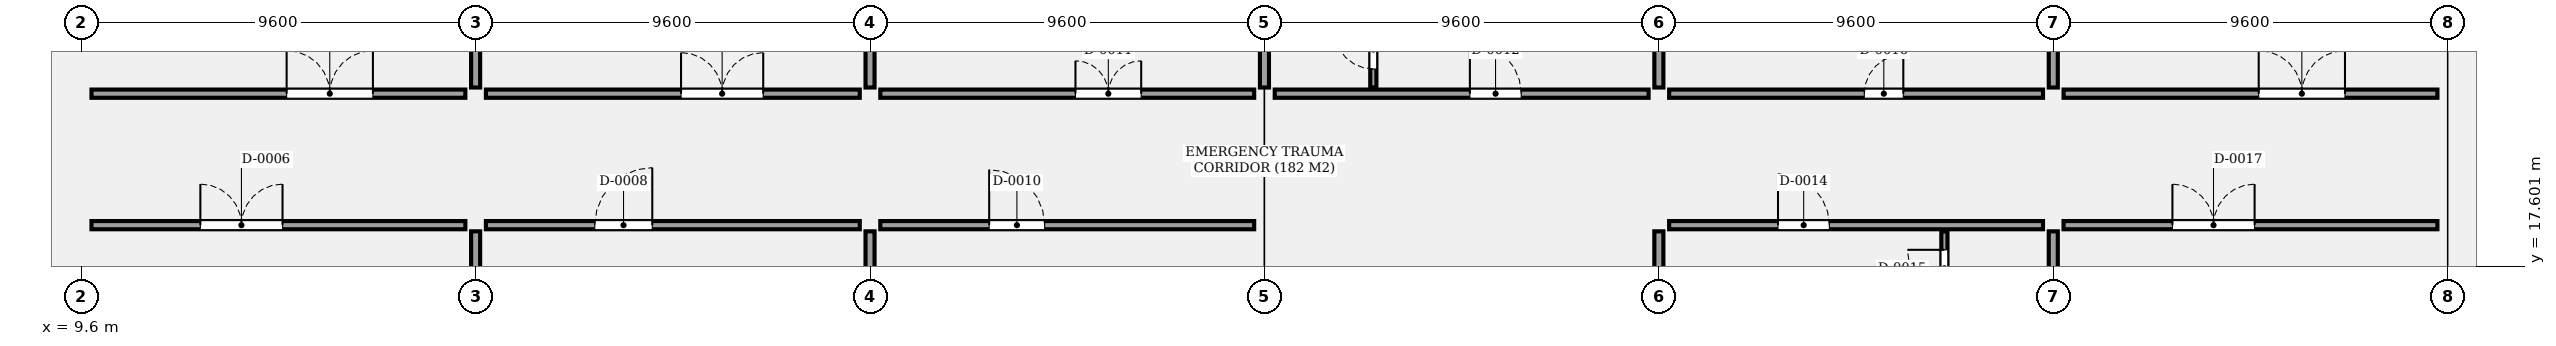
"""IFC4 building model, lengths in metres.
Left out: names, types, materials, properties, quantities, classifications, styles, units other than length and angle.
Written with IfcOpenShell. Run it as: python <this file> out.ifc"""

import sys

from ifc_helpers import new_model, si_unit, direction, frame, frame_2d, origin, place, context, subcontext, project, spatial, rectangle, extrude, element, fill, save


model = new_model("IFC4")
c1 = context("Model", 3, precision=1e-05, world=origin(), true_north=direction((0.0, 1.0)))
c2 = subcontext(c1, "Body", "Model", "MODEL_VIEW")
j1 = project(units=[si_unit("LENGTHUNIT", "METRE"), si_unit("PLANEANGLEUNIT", "RADIAN")], contexts=[c1])
p1 = place(None, origin())
s1 = spatial("IfcSite", under=j1, at=p1, CompositionType="ELEMENT")
p2 = place(p1, origin())
s2 = spatial("IfcBuilding", under=s1, at=p2, CompositionType="ELEMENT")
p3 = place(p2, origin())
s3 = spatial("IfcBuildingStorey", under=s2, at=p3, CompositionType="ELEMENT", Elevation=0.0)
p4 = place(p3, frame((9.85, 18.6, 0.0), z_axis=(0.0, 0.0, 1.0), x_axis=(1.0, 0.0, 0.0)))
e1 = element("IfcWall", 1, at=p4, inside=s3, PredefinedType="PARTITIONING", context=c2, shape_type="SweptSolid", body=[
    extrude(rectangle(XDim=9.1, YDim=0.2, at=frame_2d((4.55, 0.0))), origin(), (0.0, 0.0, 1.0), 3.98),
])
p5 = place(p4, frame((2.65, 0.0, 0.0)))
e2 = element("IfcOpeningElement", 2, at=p5, cuts=e1, PredefinedType="OPENING", context=c2, shape_type="SweptSolid", body=[
    extrude(rectangle(XDim=2.0, YDim=2.4, at=frame_2d((1.0, 1.2))), frame((0.0, 0.11, 0.0), z_axis=(0.0, -1.0, 0.0), x_axis=(1.0, 0.0, 0.0)), (0.0, 0.0, 1.0), 0.22),
])
p6 = place(p3, frame((9.85, 21.8, 0.0), z_axis=(0.0, 0.0, 1.0), x_axis=(1.0, 0.0, 0.0)))
e3 = element("IfcWall", 3, at=p6, inside=s3, PredefinedType="PARTITIONING", context=c2, shape_type="SweptSolid", body=[
    extrude(rectangle(XDim=9.1, YDim=0.2, at=frame_2d((4.55, 0.0))), origin(), (0.0, 0.0, 1.0), 3.98),
])
p7 = place(p6, frame((4.75, 0.0, 0.0)))
e4 = element("IfcOpeningElement", 4, at=p7, cuts=e3, PredefinedType="OPENING", context=c2, shape_type="SweptSolid", body=[
    extrude(rectangle(XDim=2.1, YDim=2.4, at=frame_2d((1.05, 1.2))), frame((0.0, 0.11, 0.0), z_axis=(0.0, -1.0, 0.0), x_axis=(1.0, 0.0, 0.0)), (0.0, 0.0, 1.0), 0.22),
])
p8 = place(p3, frame((19.45, 18.6, 0.0), z_axis=(0.0, 0.0, 1.0), x_axis=(1.0, 0.0, 0.0)))
e5 = element("IfcWall", 5, at=p8, inside=s3, PredefinedType="PARTITIONING", context=c2, shape_type="SweptSolid", body=[
    extrude(rectangle(XDim=9.1, YDim=0.2, at=frame_2d((4.55, 0.0))), origin(), (0.0, 0.0, 1.0), 3.98),
])
p9 = place(p8, frame((2.65, 0.0, 0.0)))
e6 = element("IfcOpeningElement", 6, at=p9, cuts=e5, PredefinedType="OPENING", context=c2, shape_type="SweptSolid", body=[
    extrude(rectangle(XDim=1.4, YDim=2.4, at=frame_2d((0.7, 1.2))), frame((0.0, 0.11, 0.0), z_axis=(0.0, -1.0, 0.0), x_axis=(1.0, 0.0, 0.0)), (0.0, 0.0, 1.0), 0.22),
])
p10 = place(p3, frame((19.2, 0.55, 0.0), z_axis=(0.0, 0.0, 1.0), x_axis=(0.0, 1.0, 0.0)))
e7 = element("IfcWall", 7, at=p10, inside=s3, PredefinedType="PARTITIONING", context=c2, shape_type="SweptSolid", body=[
    extrude(rectangle(XDim=17.9, YDim=0.22, at=frame_2d((8.95, 0.0))), origin(), (0.0, 0.0, 1.0), 3.98),
])
p11 = place(p3, frame((19.45, 21.8, 0.0), z_axis=(0.0, 0.0, 1.0), x_axis=(1.0, 0.0, 0.0)))
e8 = element("IfcWall", 8, at=p11, inside=s3, PredefinedType="PARTITIONING", context=c2, shape_type="SweptSolid", body=[
    extrude(rectangle(XDim=9.1, YDim=0.2, at=frame_2d((4.55, 0.0))), origin(), (0.0, 0.0, 1.0), 3.98),
])
p12 = place(p11, frame((4.75, 0.0, 0.0)))
e9 = element("IfcOpeningElement", 9, at=p12, cuts=e8, PredefinedType="OPENING", context=c2, shape_type="SweptSolid", body=[
    extrude(rectangle(XDim=2.0, YDim=2.4, at=frame_2d((1.0, 1.2))), frame((0.0, 0.11, 0.0), z_axis=(0.0, -1.0, 0.0), x_axis=(1.0, 0.0, 0.0)), (0.0, 0.0, 1.0), 0.22),
])
p13 = place(p3, frame((19.2, 21.95, 0.0), z_axis=(0.0, 0.0, 1.0), x_axis=(0.0, 1.0, 0.0)))
e10 = element("IfcWall", 10, at=p13, inside=s3, PredefinedType="PARTITIONING", context=c2, shape_type="SweptSolid", body=[
    extrude(rectangle(XDim=11.1, YDim=0.22, at=frame_2d((5.55, 0.0))), origin(), (0.0, 0.0, 1.0), 3.98),
])
p14 = place(p3, frame((29.05, 18.6, 0.0), z_axis=(0.0, 0.0, 1.0), x_axis=(1.0, 0.0, 0.0)))
e11 = element("IfcWall", 11, at=p14, inside=s3, PredefinedType="PARTITIONING", context=c2, shape_type="SweptSolid", body=[
    extrude(rectangle(XDim=9.1, YDim=0.2, at=frame_2d((4.55, 0.0))), origin(), (0.0, 0.0, 1.0), 3.98),
])
p15 = place(p14, frame((2.65, 0.0, 0.0)))
e12 = element("IfcOpeningElement", 12, at=p15, cuts=e11, PredefinedType="OPENING", context=c2, shape_type="SweptSolid", body=[
    extrude(rectangle(XDim=1.35, YDim=2.4, at=frame_2d((0.675, 1.2))), frame((0.0, 0.11, 0.0), z_axis=(0.0, -1.0, 0.0), x_axis=(1.0, 0.0, 0.0)), (0.0, 0.0, 1.0), 0.22),
])
p16 = place(p3, frame((28.8, 0.55, 0.0), z_axis=(0.0, 0.0, 1.0), x_axis=(0.0, 1.0, 0.0)))
e13 = element("IfcWall", 13, at=p16, inside=s3, PredefinedType="PARTITIONING", context=c2, shape_type="SweptSolid", body=[
    extrude(rectangle(XDim=17.9, YDim=0.22, at=frame_2d((8.95, 0.0))), origin(), (0.0, 0.0, 1.0), 3.98),
])
p17 = place(p3, frame((29.05, 21.8, 0.0), z_axis=(0.0, 0.0, 1.0), x_axis=(1.0, 0.0, 0.0)))
e14 = element("IfcWall", 14, at=p17, inside=s3, PredefinedType="PARTITIONING", context=c2, shape_type="SweptSolid", body=[
    extrude(rectangle(XDim=9.1, YDim=0.2, at=frame_2d((4.55, 0.0))), origin(), (0.0, 0.0, 1.0), 3.98),
])
p18 = place(p17, frame((4.75, 0.0, 0.0)))
e15 = element("IfcOpeningElement", 15, at=p18, cuts=e14, PredefinedType="OPENING", context=c2, shape_type="SweptSolid", body=[
    extrude(rectangle(XDim=1.6, YDim=2.2, at=frame_2d((0.8, 1.1))), frame((0.0, 0.11, 0.0), z_axis=(0.0, -1.0, 0.0), x_axis=(1.0, 0.0, 0.0)), (0.0, 0.0, 1.0), 0.22),
])
p19 = place(p3, frame((28.8, 21.95, 0.0), z_axis=(0.0, 0.0, 1.0), x_axis=(0.0, 1.0, 0.0)))
e16 = element("IfcWall", 16, at=p19, inside=s3, PredefinedType="PARTITIONING", context=c2, shape_type="SweptSolid", body=[
    extrude(rectangle(XDim=11.1, YDim=0.22, at=frame_2d((5.55, 0.0))), origin(), (0.0, 0.0, 1.0), 3.98),
])
p20 = place(p3, frame((38.65, 21.8, 0.0), z_axis=(0.0, 0.0, 1.0), x_axis=(1.0, 0.0, 0.0)))
e17 = element("IfcWall", 17, at=p20, inside=s3, PredefinedType="PARTITIONING", context=c2, shape_type="SweptSolid", body=[
    extrude(rectangle(XDim=9.1, YDim=0.2, at=frame_2d((4.55, 0.0))), origin(), (0.0, 0.0, 1.0), 3.98),
])
p21 = place(p20, frame((4.75, 0.0, 0.0)))
e18 = element("IfcOpeningElement", 18, at=p21, cuts=e17, PredefinedType="OPENING", context=c2, shape_type="SweptSolid", body=[
    extrude(rectangle(XDim=1.25, YDim=2.2, at=frame_2d((0.625, 1.1))), frame((0.0, 0.11, 0.0), z_axis=(0.0, -1.0, 0.0), x_axis=(1.0, 0.0, 0.0)), (0.0, 0.0, 1.0), 0.22),
])
p22 = place(p3, frame((41.05, 21.95, 0.0), z_axis=(0.0, 0.0, 1.0), x_axis=(0.0, 1.0, 0.0)))
e19 = element("IfcWall", 19, at=p22, inside=s3, PredefinedType="PARTITIONING", context=c2, shape_type="SweptSolid", body=[
    extrude(rectangle(XDim=2.3, YDim=0.15, at=frame_2d((1.15, 0.0))), origin(), (0.0, 0.0, 1.0), 3.98),
])
p23 = place(p22, frame((0.45, 0.0, 0.0)))
e20 = element("IfcOpeningElement", 20, at=p23, cuts=e19, PredefinedType="OPENING", context=c2, shape_type="SweptSolid", body=[
    extrude(rectangle(XDim=0.95, YDim=2.1, at=frame_2d((0.475, 1.05))), frame((0.0, 0.085, 0.0), z_axis=(0.0, -1.0, 0.0), x_axis=(1.0, 0.0, 0.0)), (0.0, 0.0, 1.0), 0.17),
])
p24 = place(p3, frame((38.4, 21.95, 0.0), z_axis=(0.0, 0.0, 1.0), x_axis=(0.0, 1.0, 0.0)))
e21 = element("IfcWall", 21, at=p24, inside=s3, PredefinedType="PARTITIONING", context=c2, shape_type="SweptSolid", body=[
    extrude(rectangle(XDim=11.1, YDim=0.22, at=frame_2d((5.55, 0.0))), origin(), (0.0, 0.0, 1.0), 3.98),
])
p25 = place(p3, frame((48.25, 18.6, 0.0), z_axis=(0.0, 0.0, 1.0), x_axis=(1.0, 0.0, 0.0)))
e22 = element("IfcWall", 22, at=p25, inside=s3, PredefinedType="PARTITIONING", context=c2, shape_type="SweptSolid", body=[
    extrude(rectangle(XDim=9.1, YDim=0.2, at=frame_2d((4.55, 0.0))), origin(), (0.0, 0.0, 1.0), 3.98),
])
p26 = place(p25, frame((2.65, 0.0, 0.0)))
e23 = element("IfcOpeningElement", 23, at=p26, cuts=e22, PredefinedType="OPENING", context=c2, shape_type="SweptSolid", body=[
    extrude(rectangle(XDim=1.25, YDim=2.2, at=frame_2d((0.625, 1.1))), frame((0.0, 0.11, 0.0), z_axis=(0.0, -1.0, 0.0), x_axis=(1.0, 0.0, 0.0)), (0.0, 0.0, 1.0), 0.22),
])
p27 = place(p3, frame((54.95, 16.15, 0.0), z_axis=(0.0, 0.0, 1.0), x_axis=(0.0, 1.0, 0.0)))
e24 = element("IfcWall", 24, at=p27, inside=s3, PredefinedType="PARTITIONING", context=c2, shape_type="SweptSolid", body=[
    extrude(rectangle(XDim=2.3, YDim=0.15, at=frame_2d((1.15, 0.0))), origin(), (0.0, 0.0, 1.0), 3.98),
])
p28 = place(p27, frame((0.95, 0.0, 0.0)))
e25 = element("IfcOpeningElement", 25, at=p28, cuts=e24, PredefinedType="OPENING", context=c2, shape_type="SweptSolid", body=[
    extrude(rectangle(XDim=0.9, YDim=2.1, at=frame_2d((0.45, 1.05))), frame((0.0, 0.085, 0.0), z_axis=(0.0, -1.0, 0.0), x_axis=(1.0, 0.0, 0.0)), (0.0, 0.0, 1.0), 0.17),
])
p29 = place(p3, frame((48.0, 0.55, 0.0), z_axis=(0.0, 0.0, 1.0), x_axis=(0.0, 1.0, 0.0)))
e26 = element("IfcWall", 26, at=p29, inside=s3, PredefinedType="PARTITIONING", context=c2, shape_type="SweptSolid", body=[
    extrude(rectangle(XDim=17.9, YDim=0.22, at=frame_2d((8.95, 0.0))), origin(), (0.0, 0.0, 1.0), 3.98),
])
p30 = place(p3, frame((48.25, 21.8, 0.0), z_axis=(0.0, 0.0, 1.0), x_axis=(1.0, 0.0, 0.0)))
e27 = element("IfcWall", 27, at=p30, inside=s3, PredefinedType="PARTITIONING", context=c2, shape_type="SweptSolid", body=[
    extrude(rectangle(XDim=9.1, YDim=0.2, at=frame_2d((4.55, 0.0))), origin(), (0.0, 0.0, 1.0), 3.98),
])
p31 = place(p30, frame((4.75, 0.0, 0.0)))
e28 = element("IfcOpeningElement", 28, at=p31, cuts=e27, PredefinedType="OPENING", context=c2, shape_type="SweptSolid", body=[
    extrude(rectangle(XDim=0.95, YDim=2.1, at=frame_2d((0.475, 1.05))), frame((0.0, 0.11, 0.0), z_axis=(0.0, -1.0, 0.0), x_axis=(1.0, 0.0, 0.0)), (0.0, 0.0, 1.0), 0.22),
])
p32 = place(p3, frame((48.0, 21.95, 0.0), z_axis=(0.0, 0.0, 1.0), x_axis=(0.0, 1.0, 0.0)))
e29 = element("IfcWall", 29, at=p32, inside=s3, PredefinedType="PARTITIONING", context=c2, shape_type="SweptSolid", body=[
    extrude(rectangle(XDim=11.1, YDim=0.22, at=frame_2d((5.55, 0.0))), origin(), (0.0, 0.0, 1.0), 3.98),
])
p33 = place(p3, frame((57.85, 18.6, 0.0), z_axis=(0.0, 0.0, 1.0), x_axis=(1.0, 0.0, 0.0)))
e30 = element("IfcWall", 30, at=p33, inside=s3, PredefinedType="PARTITIONING", context=c2, shape_type="SweptSolid", body=[
    extrude(rectangle(XDim=9.1, YDim=0.2, at=frame_2d((4.55, 0.0))), origin(), (0.0, 0.0, 1.0), 3.98),
])
p34 = place(p33, frame((2.65, 0.0, 0.0)))
e31 = element("IfcOpeningElement", 31, at=p34, cuts=e30, PredefinedType="OPENING", context=c2, shape_type="SweptSolid", body=[
    extrude(rectangle(XDim=2.0, YDim=2.4, at=frame_2d((1.0, 1.2))), frame((0.0, 0.11, 0.0), z_axis=(0.0, -1.0, 0.0), x_axis=(1.0, 0.0, 0.0)), (0.0, 0.0, 1.0), 0.22),
])
p35 = place(p3, frame((57.6, 0.55, 0.0), z_axis=(0.0, 0.0, 1.0), x_axis=(0.0, 1.0, 0.0)))
e32 = element("IfcWall", 32, at=p35, inside=s3, PredefinedType="PARTITIONING", context=c2, shape_type="SweptSolid", body=[
    extrude(rectangle(XDim=17.9, YDim=0.22, at=frame_2d((8.95, 0.0))), origin(), (0.0, 0.0, 1.0), 3.98),
])
p36 = place(p3, frame((57.85, 21.8, 0.0), z_axis=(0.0, 0.0, 1.0), x_axis=(1.0, 0.0, 0.0)))
e33 = element("IfcWall", 33, at=p36, inside=s3, PredefinedType="PARTITIONING", context=c2, shape_type="SweptSolid", body=[
    extrude(rectangle(XDim=9.1, YDim=0.2, at=frame_2d((4.55, 0.0))), origin(), (0.0, 0.0, 1.0), 3.98),
])
p37 = place(p36, frame((4.75, 0.0, 0.0)))
e34 = element("IfcOpeningElement", 34, at=p37, cuts=e33, PredefinedType="OPENING", context=c2, shape_type="SweptSolid", body=[
    extrude(rectangle(XDim=2.1, YDim=2.4, at=frame_2d((1.05, 1.2))), frame((0.0, 0.11, 0.0), z_axis=(0.0, -1.0, 0.0), x_axis=(1.0, 0.0, 0.0)), (0.0, 0.0, 1.0), 0.22),
])
p38 = place(p3, frame((57.6, 21.95, 0.0), z_axis=(0.0, 0.0, 1.0), x_axis=(0.0, 1.0, 0.0)))
e35 = element("IfcWall", 35, at=p38, inside=s3, PredefinedType="PARTITIONING", context=c2, shape_type="SweptSolid", body=[
    extrude(rectangle(XDim=11.1, YDim=0.22, at=frame_2d((5.55, 0.0))), origin(), (0.0, 0.0, 1.0), 3.98),
])
p39 = place(p5, origin())
e36 = element("IfcDoor", 36, at=p39, inside=s3, OperationType="DOUBLE_DOOR_SINGLE_SWING", PredefinedType="DOOR", context=c2, shape_type="SweptSolid", body=[
    extrude(rectangle(XDim=2.0, YDim=2.4, at=frame_2d((1.0, 1.2))), frame((0.0, 0.025, 0.0), z_axis=(0.0, -1.0, 0.0), x_axis=(1.0, 0.0, 0.0)), (0.0, 0.0, 1.0), 0.05),
])
fill(e2, e36)
p40 = place(p7, origin())
e37 = element("IfcDoor", 37, at=p40, inside=s3, OperationType="DOUBLE_DOOR_SINGLE_SWING", PredefinedType="DOOR", context=c2, shape_type="SweptSolid", body=[
    extrude(rectangle(XDim=2.1, YDim=2.4, at=frame_2d((1.05, 1.2))), frame((0.0, 0.025, 0.0), z_axis=(0.0, -1.0, 0.0), x_axis=(1.0, 0.0, 0.0)), (0.0, 0.0, 1.0), 0.05),
])
fill(e4, e37)
p41 = place(p9, origin())
e38 = element("IfcDoor", 38, at=p41, inside=s3, OperationType="SINGLE_SWING_RIGHT", PredefinedType="DOOR", context=c2, shape_type="SweptSolid", body=[
    extrude(rectangle(XDim=1.4, YDim=2.4, at=frame_2d((0.7, 1.2))), frame((0.0, 0.025, 0.0), z_axis=(0.0, -1.0, 0.0), x_axis=(1.0, 0.0, 0.0)), (0.0, 0.0, 1.0), 0.05),
])
fill(e6, e38)
p42 = place(p12, origin())
e39 = element("IfcDoor", 39, at=p42, inside=s3, OperationType="DOUBLE_DOOR_SINGLE_SWING", PredefinedType="DOOR", context=c2, shape_type="SweptSolid", body=[
    extrude(rectangle(XDim=2.0, YDim=2.4, at=frame_2d((1.0, 1.2))), frame((0.0, 0.025, 0.0), z_axis=(0.0, -1.0, 0.0), x_axis=(1.0, 0.0, 0.0)), (0.0, 0.0, 1.0), 0.05),
])
fill(e9, e39)
p43 = place(p15, origin())
e40 = element("IfcDoor", 40, at=p43, inside=s3, OperationType="SINGLE_SWING_LEFT", PredefinedType="DOOR", context=c2, shape_type="SweptSolid", body=[
    extrude(rectangle(XDim=1.35, YDim=2.4, at=frame_2d((0.675, 1.2))), frame((0.0, 0.025, 0.0), z_axis=(0.0, -1.0, 0.0), x_axis=(1.0, 0.0, 0.0)), (0.0, 0.0, 1.0), 0.05),
])
fill(e12, e40)
p44 = place(p18, origin())
e41 = element("IfcDoor", 41, at=p44, inside=s3, OperationType="DOUBLE_DOOR_SINGLE_SWING", PredefinedType="DOOR", context=c2, shape_type="SweptSolid", body=[
    extrude(rectangle(XDim=1.6, YDim=2.2, at=frame_2d((0.8, 1.1))), frame((0.0, 0.025, 0.0), z_axis=(0.0, -1.0, 0.0), x_axis=(1.0, 0.0, 0.0)), (0.0, 0.0, 1.0), 0.05),
])
fill(e15, e41)
p45 = place(p21, origin())
e42 = element("IfcDoor", 42, at=p45, inside=s3, OperationType="SINGLE_SWING_LEFT", PredefinedType="DOOR", context=c2, shape_type="SweptSolid", body=[
    extrude(rectangle(XDim=1.25, YDim=2.2, at=frame_2d((0.625, 1.1))), frame((0.0, 0.025, 0.0), z_axis=(0.0, -1.0, 0.0), x_axis=(1.0, 0.0, 0.0)), (0.0, 0.0, 1.0), 0.05),
])
fill(e18, e42)
p46 = place(p23, origin())
e43 = element("IfcDoor", 43, at=p46, inside=s3, OperationType="SINGLE_SWING_RIGHT", PredefinedType="DOOR", context=c2, shape_type="SweptSolid", body=[
    extrude(rectangle(XDim=0.95, YDim=2.1, at=frame_2d((0.475, 1.05))), frame((0.0, 0.025, 0.0), z_axis=(0.0, -1.0, 0.0), x_axis=(1.0, 0.0, 0.0)), (0.0, 0.0, 1.0), 0.05),
])
fill(e20, e43)
p47 = place(p26, origin())
e44 = element("IfcDoor", 44, at=p47, inside=s3, OperationType="SINGLE_SWING_LEFT", PredefinedType="DOOR", context=c2, shape_type="SweptSolid", body=[
    extrude(rectangle(XDim=1.25, YDim=2.2, at=frame_2d((0.625, 1.1))), frame((0.0, 0.025, 0.0), z_axis=(0.0, -1.0, 0.0), x_axis=(1.0, 0.0, 0.0)), (0.0, 0.0, 1.0), 0.05),
])
fill(e23, e44)
p48 = place(p28, origin())
e45 = element("IfcDoor", 45, at=p48, inside=s3, OperationType="SINGLE_SWING_RIGHT", PredefinedType="DOOR", context=c2, shape_type="SweptSolid", body=[
    extrude(rectangle(XDim=0.9, YDim=2.1, at=frame_2d((0.45, 1.05))), frame((0.0, 0.025, 0.0), z_axis=(0.0, -1.0, 0.0), x_axis=(1.0, 0.0, 0.0)), (0.0, 0.0, 1.0), 0.05),
])
fill(e25, e45)
p49 = place(p31, origin())
e46 = element("IfcDoor", 46, at=p49, inside=s3, OperationType="SINGLE_SWING_RIGHT", PredefinedType="DOOR", context=c2, shape_type="SweptSolid", body=[
    extrude(rectangle(XDim=0.95, YDim=2.1, at=frame_2d((0.475, 1.05))), frame((0.0, 0.025, 0.0), z_axis=(0.0, -1.0, 0.0), x_axis=(1.0, 0.0, 0.0)), (0.0, 0.0, 1.0), 0.05),
])
fill(e28, e46)
p50 = place(p34, origin())
e47 = element("IfcDoor", 47, at=p50, inside=s3, OperationType="DOUBLE_DOOR_SINGLE_SWING", PredefinedType="DOOR", context=c2, shape_type="SweptSolid", body=[
    extrude(rectangle(XDim=2.0, YDim=2.4, at=frame_2d((1.0, 1.2))), frame((0.0, 0.025, 0.0), z_axis=(0.0, -1.0, 0.0), x_axis=(1.0, 0.0, 0.0)), (0.0, 0.0, 1.0), 0.05),
])
fill(e31, e47)
p51 = place(p37, origin())
e48 = element("IfcDoor", 48, at=p51, inside=s3, OperationType="DOUBLE_DOOR_SINGLE_SWING", PredefinedType="DOOR", context=c2, shape_type="SweptSolid", body=[
    extrude(rectangle(XDim=2.1, YDim=2.4, at=frame_2d((1.05, 1.2))), frame((0.0, 0.025, 0.0), z_axis=(0.0, -1.0, 0.0), x_axis=(1.0, 0.0, 0.0)), (0.0, 0.0, 1.0), 0.05),
])
fill(e34, e48)
save(model, sys.argv[1])
